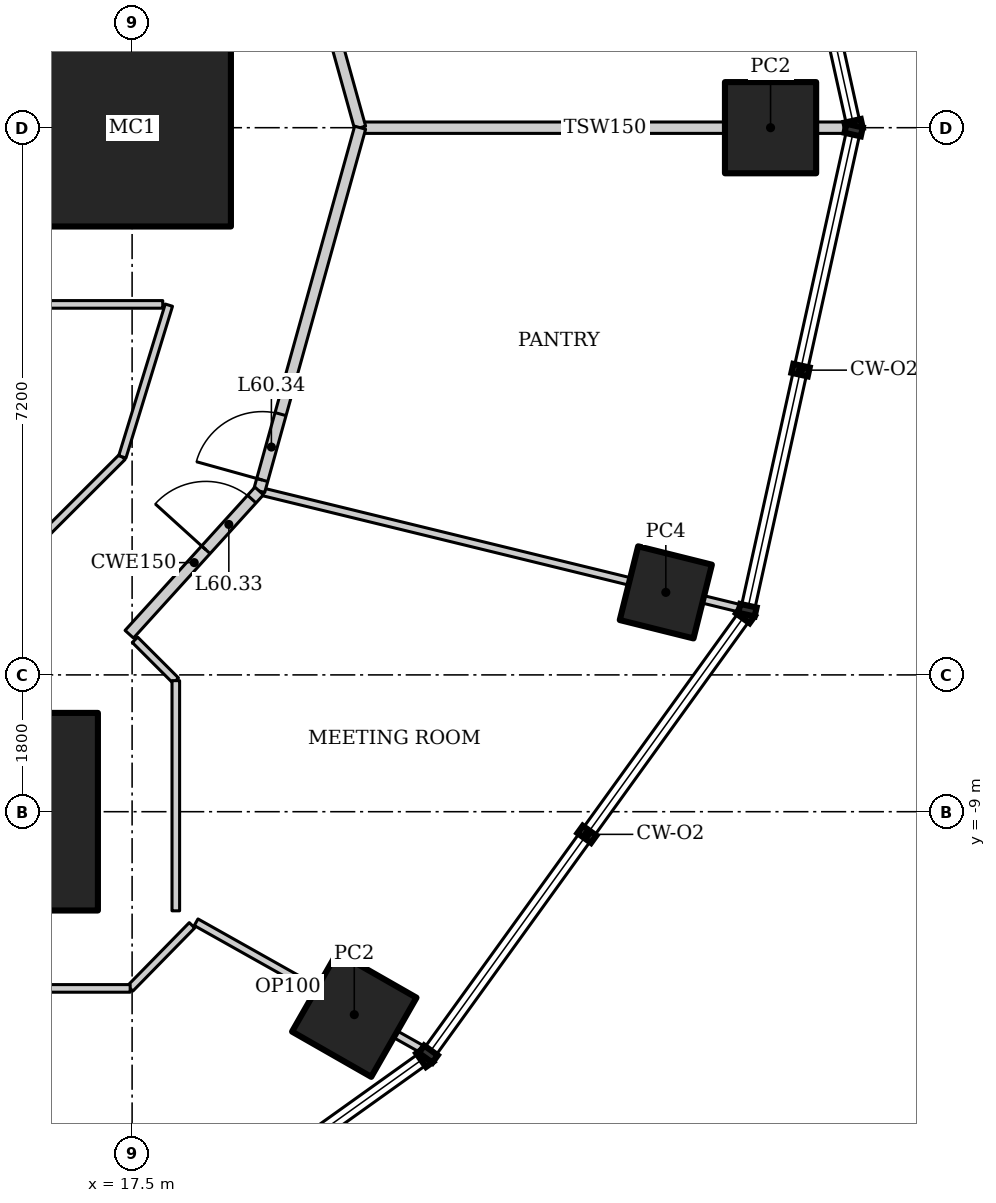
"""IFC4 building model, lengths in metres.
Left out: names, types, materials, properties, quantities, classifications, styles, units other than length and angle.
Written with IfcOpenShell. Run it as: python <this file> out.ifc"""

import sys

from ifc_helpers import new_model, si_unit, direction, frame, frame_2d, origin, origin_2d, place, context, subcontext, project, spatial, rectangle, hollow_rectangle, extrude, element, fill, save


model = new_model("IFC4")
c1 = context("Model", 3, precision=1e-05, world=origin(), true_north=direction((0.0, 1.0)))
c2 = subcontext(c1, "Body", "Model", "MODEL_VIEW")
j1 = project(units=[si_unit("LENGTHUNIT", "METRE"), si_unit("PLANEANGLEUNIT", "RADIAN")], contexts=[c1])
p1 = place(None, origin())
s1 = spatial("IfcSite", under=j1, at=p1, CompositionType="ELEMENT")
p2 = place(p1, origin())
s2 = spatial("IfcBuilding", under=s1, at=p2, CompositionType="ELEMENT")
p3 = place(p2, frame((0.0, 0.0, 257.8)))
s3 = spatial("IfcBuildingStorey", under=s2, at=p3, CompositionType="ELEMENT", Elevation=257.8)
for number, where, z_axis, x_axis in (
    (1, (17.5, 0.0, 0.0), (0.0, 0.0, 1.0), (1.0, 0.0, 0.0)),
    (2, (15.75, -9.0, 0.0), (0.0, 0.0, 1.0), (1.0, 0.0, 0.0)),
):
    element("IfcColumn", number, at=place(p3, frame(where, z_axis=z_axis, x_axis=x_axis)), inside=s3, PredefinedType="COLUMN", context=c2, shape_type="SweptSolid", body=[
        extrude(hollow_rectangle(XDim=2.6, YDim=2.6, WallThickness=0.13, at=origin_2d()), origin(), (0.0, 0.0, 1.0), 4.2),
    ])
for number, where, z_axis, x_axis in (
    (3, (25.9, 0.0, 0.0), (0.0, 0.0, 1.0), (1.0, 0.0, 0.0)),
    (4, (20.423, -11.67, 0.0), (0.0, 0.0, 1.0), (0.496, 0.868, 0.0)),
):
    element("IfcColumn", number, at=place(p3, frame(where, z_axis=z_axis, x_axis=x_axis)), inside=s3, PredefinedType="COLUMN", context=c2, shape_type="SweptSolid", body=[
        extrude(hollow_rectangle(XDim=1.2, YDim=1.2, WallThickness=0.1, at=origin_2d()), origin(), (0.0, 0.0, 1.0), 4.2),
    ])
p4 = place(p3, frame((24.522, -6.114, 0.0), z_axis=(0.0, 0.0, 1.0), x_axis=(0.2419218956, 0.970295726276, 0.0)))
e5 = element("IfcColumn", 5, at=p4, inside=s3, PredefinedType="COLUMN", context=c2, shape_type="SweptSolid", body=[
    extrude(hollow_rectangle(XDim=1.0, YDim=1.0, WallThickness=0.08, at=origin_2d()), origin(), (0.0, 0.0, 1.0), 4.2),
])
p5 = place(p3, frame((26.944, 0.0, 0.0), z_axis=(0.0, 0.0, 1.0), x_axis=(-1.0, 0.0, 0.0)))
e6 = element("IfcWall", 6, at=p5, inside=s3, PredefinedType="PARTITIONING", context=c2, shape_type="SweptSolid", body=[
    extrude(rectangle(XDim=6.444, YDim=0.15, at=frame_2d((3.222, 0.0))), origin(), (0.0, 0.0, 1.0), 3.349),
])
p6 = place(p3, frame((25.543, -6.335, 0.0), z_axis=(0.0, 0.0, 1.0), x_axis=(-0.971467850621, 0.237171278215, 0.0)))
e7 = element("IfcWall", 7, at=p6, inside=s3, PredefinedType="PARTITIONING", context=c2, shape_type="SweptSolid", body=[
    extrude(rectangle(XDim=6.558, YDim=0.1, at=frame_2d((3.279, 0.0))), origin(), (0.0, 0.0, 1.0), 3.108),
])
p7 = place(p3, frame((20.5, 0.0, 0.0), z_axis=(0.0, 0.0, 1.0), x_axis=(-0.26770731566, 0.963500281859, 0.0)))
e8 = element("IfcWall", 8, at=p7, inside=s3, PredefinedType="PARTITIONING", context=c2, shape_type="SweptSolid", body=[
    extrude(rectangle(XDim=4.961, YDim=0.15, at=frame_2d((2.48, 0.0))), origin(), (0.0, 0.0, 1.0), 4.05),
])
p8 = place(p3, frame((19.172, -4.78, 0.0), z_axis=(0.0, 0.0, 1.0), x_axis=(0.26770731566, 0.963500281859, 0.0)))
e9 = element("IfcWall", 9, at=p8, inside=s3, PredefinedType="PARTITIONING", context=c2, shape_type="SweptSolid", body=[
    extrude(rectangle(XDim=4.961, YDim=0.15, at=frame_2d((2.48, 0.0))), origin(), (0.0, 0.0, 1.0), 4.05),
])
p9 = place(p8, frame((0.15, 0.0, 0.0)))
e10 = element("IfcOpeningElement", 10, at=p9, cuts=e9, PredefinedType="OPENING", context=c2, shape_type="SweptSolid", body=[
    extrude(rectangle(XDim=0.9, YDim=2.1, at=frame_2d((0.45, 1.05))), frame((0.0, 0.085, 0.0), z_axis=(0.0, -1.0, 0.0), x_axis=(1.0, 0.0, 0.0)), (0.0, 0.0, 1.0), 0.17),
])
p10 = place(p3, frame((21.358, -12.15, 0.0), z_axis=(0.0, 0.0, 1.0), x_axis=(-0.871730019583, 0.489986502832, 0.0)))
e11 = element("IfcWall", 11, at=p10, inside=s3, PredefinedType="PARTITIONING", context=c2, shape_type="SweptSolid", body=[
    extrude(rectangle(XDim=3.46, YDim=0.1, at=frame_2d((1.73, 0.0))), origin(), (0.0, 0.0, 1.0), 3.522),
])
p11 = place(p3, frame((17.463, -6.665, 0.0), z_axis=(0.0, 0.0, 1.0), x_axis=(0.671721890643, 0.74080341632, 0.0)))
e12 = element("IfcWall", 12, at=p11, inside=s3, PredefinedType="PARTITIONING", context=c2, shape_type="SweptSolid", body=[
    extrude(rectangle(XDim=2.544, YDim=0.15, at=frame_2d((1.272, 0.0))), origin(), (0.0, 0.0, 1.0), 4.05),
])
p12 = place(p11, frame((1.5, 0.0, 0.0)))
e13 = element("IfcOpeningElement", 13, at=p12, cuts=e12, PredefinedType="OPENING", context=c2, shape_type="SweptSolid", body=[
    extrude(rectangle(XDim=0.9, YDim=2.1, at=frame_2d((0.45, 1.05))), frame((0.0, 0.085, 0.0), z_axis=(0.0, -1.0, 0.0), x_axis=(1.0, 0.0, 0.0)), (0.0, 0.0, 1.0), 0.17),
])
p13 = place(p3, frame((17.372, -4.331, 0.0), z_axis=(0.0, 0.0, 1.0), x_axis=(-0.707587114823, -0.70662612104, 0.0)))
e14 = element("IfcWall", 14, at=p13, inside=s3, PredefinedType="PARTITIONING", context=c2, shape_type="SweptSolid", body=[
    extrude(rectangle(XDim=3.303, YDim=0.1, at=frame_2d((1.651, 0.0))), origin(), (0.0, 0.0, 1.0), 4.05),
])
p14 = place(p3, frame((18.288, -10.495, 0.0), z_axis=(0.0, 0.0, 1.0), x_axis=(-0.699823580681, -0.714315725659, 0.0)))
e15 = element("IfcWall", 15, at=p14, inside=s3, PredefinedType="PARTITIONING", context=c2, shape_type="SweptSolid", body=[
    extrude(rectangle(XDim=1.162, YDim=0.1, at=frame_2d((0.581, 0.0))), origin(), (0.0, 0.0, 1.0), 4.05),
])
p15 = place(p3, frame((17.475, -11.325, 0.0), z_axis=(0.0, 0.0, 1.0), x_axis=(-1.0, 0.0, 0.0)))
e16 = element("IfcWall", 16, at=p15, inside=s3, PredefinedType="PARTITIONING", context=c2, shape_type="SweptSolid", body=[
    extrude(rectangle(XDim=3.449, YDim=0.1, at=frame_2d((1.725, 0.0))), origin(), (0.0, 0.0, 1.0), 4.05),
])
p16 = place(p3, frame((17.538, -6.738, 0.0), z_axis=(0.0, 0.0, 1.0), x_axis=(0.707106781187, -0.707106781187, 0.0)))
e17 = element("IfcWall", 17, at=p16, inside=s3, PredefinedType="PARTITIONING", context=c2, shape_type="SweptSolid", body=[
    extrude(rectangle(XDim=0.76, YDim=0.1, at=frame_2d((0.38, 0.0))), origin(), (0.0, 0.0, 1.0), 4.05),
])
p17 = place(p3, frame((18.075, -7.275, 0.0), z_axis=(0.0, 0.0, 1.0), x_axis=(0.0, -1.0, 0.0)))
e18 = element("IfcWall", 18, at=p17, inside=s3, PredefinedType="PARTITIONING", context=c2, shape_type="SweptSolid", body=[
    extrude(rectangle(XDim=3.029, YDim=0.1, at=frame_2d((1.514, 0.0))), origin(), (0.0, 0.0, 1.0), 3.6),
])
p18 = place(p3, frame((17.984, -2.335, 0.0), z_axis=(0.0, 0.0, 1.0), x_axis=(-0.293231279211, -0.956041535129, 0.0)))
e19 = element("IfcWall", 19, at=p18, inside=s3, PredefinedType="PARTITIONING", context=c2, shape_type="SweptSolid", body=[
    extrude(rectangle(XDim=2.088, YDim=0.1, at=frame_2d((1.044, 0.0))), origin(), (0.0, 0.0, 1.0), 4.05),
])
p19 = place(p3, frame((17.903, -2.325, 0.0), z_axis=(0.0, 0.0, 1.0), x_axis=(-1.0, 0.0, 0.0)))
e20 = element("IfcWall", 20, at=p19, inside=s3, PredefinedType="PARTITIONING", context=c2, shape_type="SweptSolid", body=[
    extrude(rectangle(XDim=2.128, YDim=0.1, at=frame_2d((1.064, 0.0))), origin(), (0.0, 0.0, 1.0), 4.05),
])
p20 = place(p12, origin())
e21 = element("IfcDoor", 21, at=p20, inside=s3, OperationType="SINGLE_SWING_LEFT", PredefinedType="DOOR", context=c2, shape_type="SweptSolid", body=[
    extrude(rectangle(XDim=0.9, YDim=2.1, at=frame_2d((0.45, 1.05))), frame((0.0, 0.025, 0.0), z_axis=(0.0, -1.0, 0.0), x_axis=(1.0, 0.0, 0.0)), (0.0, 0.0, 1.0), 0.05),
])
fill(e13, e21)
p21 = place(p9, origin())
e22 = element("IfcDoor", 22, at=p21, inside=s3, OperationType="SINGLE_SWING_LEFT", PredefinedType="DOOR", context=c2, shape_type="SweptSolid", body=[
    extrude(rectangle(XDim=0.9, YDim=2.1, at=frame_2d((0.45, 1.05))), frame((0.0, 0.025, 0.0), z_axis=(0.0, -1.0, 0.0), x_axis=(1.0, 0.0, 0.0)), (0.0, 0.0, 1.0), 0.05),
])
fill(e10, e22)
save(model, sys.argv[1])
